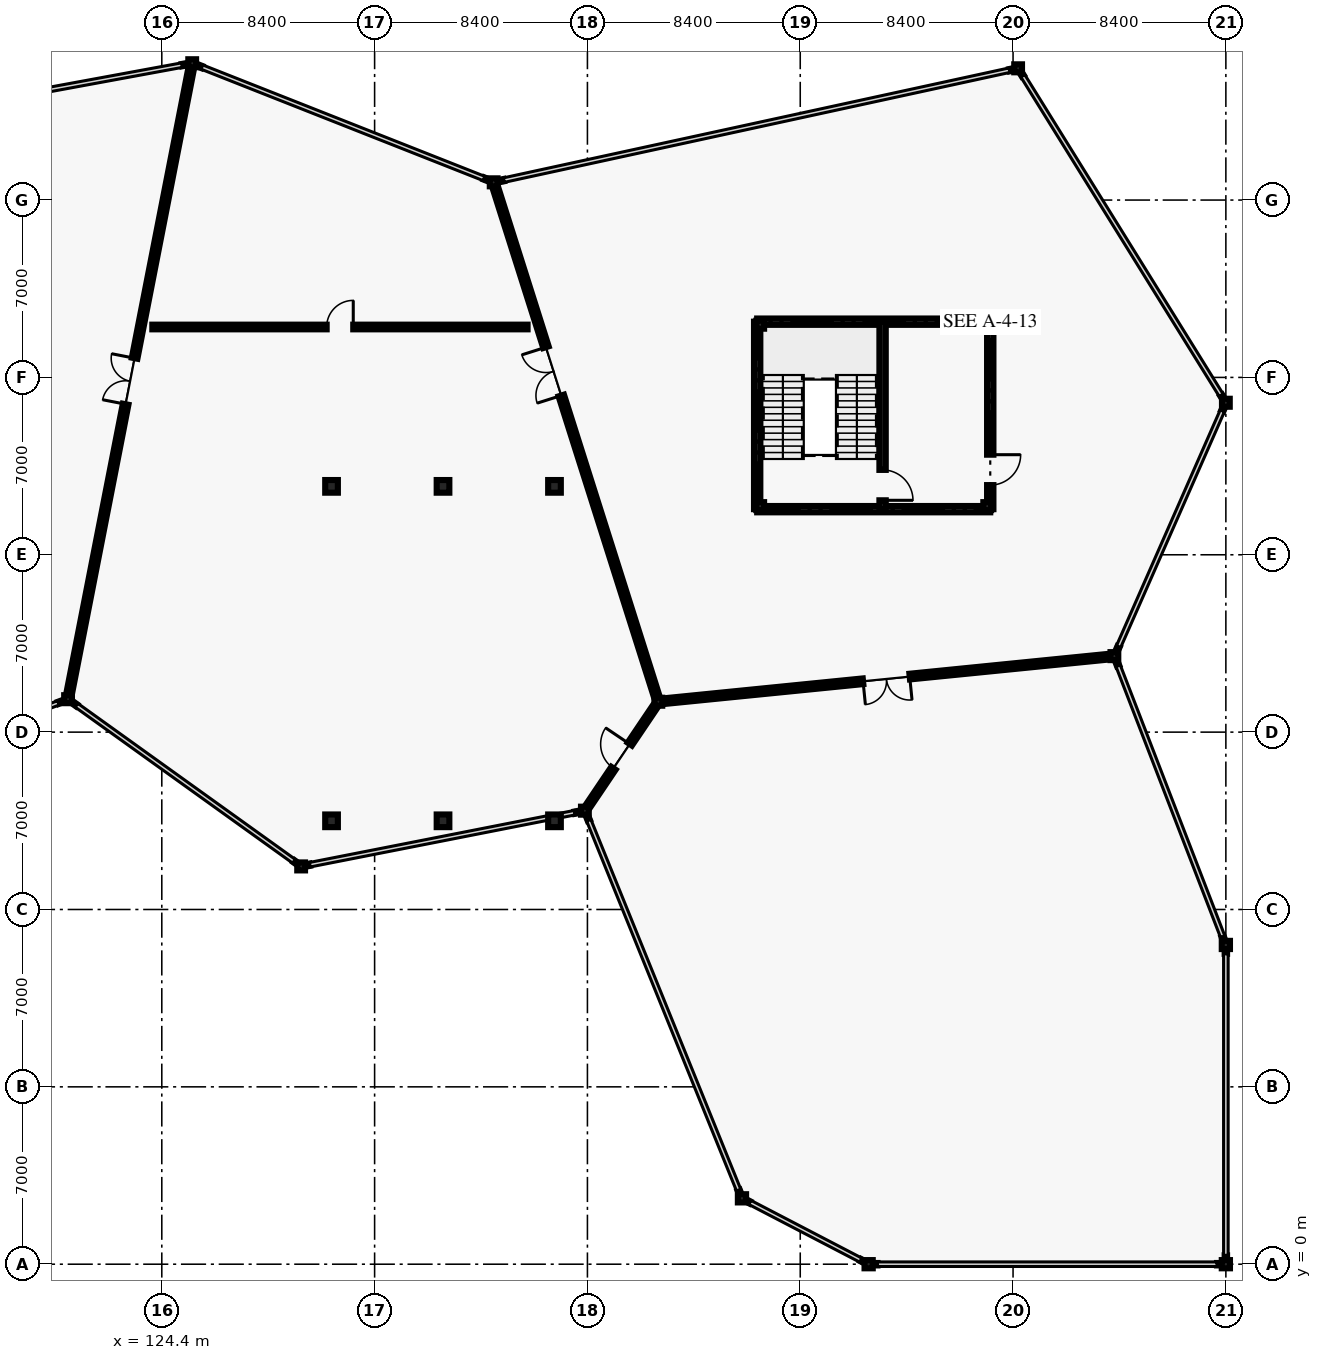
"""IFC4 building model, lengths in metres.
Left out: names, types, materials, properties, quantities, classifications, styles, units other than length and angle.
Written with IfcOpenShell. Run it as: python <this file> out.ifc"""

import sys

from ifc_helpers import new_model, si_unit, direction, frame, frame_2d, origin, origin_2d, place, context, subcontext, project, spatial, rectangle, hollow_circle, i_section, extrude, element, fill, save


model = new_model("IFC4")
c1 = context("Model", 3, precision=1e-05, world=origin(), true_north=direction((0.0, 1.0)))
c2 = subcontext(c1, "Body", "Model", "MODEL_VIEW")
j1 = project(units=[si_unit("LENGTHUNIT", "METRE"), si_unit("PLANEANGLEUNIT", "RADIAN")], contexts=[c1])
p1 = place(None, origin())
s1 = spatial("IfcSite", under=j1, at=p1, CompositionType="ELEMENT")
p2 = place(p1, origin())
s2 = spatial("IfcBuilding", under=s1, at=p2, CompositionType="ELEMENT")
p3 = place(p2, frame((0.0, 0.0, 5.4)))
s3 = spatial("IfcBuildingStorey", under=s2, at=p3, CompositionType="ELEMENT", Elevation=5.4)
for number, where, z_axis, x_axis in (
    (1, (120.7, 22.3, 0.0), (0.0, 0.0, 1.0), (1.0, 0.0, 0.0)),
    (2, (125.6, 47.4, 0.0), (0.0, 0.0, 1.0), (1.0, 0.0, 0.0)),
    (3, (129.9, 15.7, 0.0), (0.0, 0.0, 1.0), (1.0, 0.0, 0.0)),
    (4, (137.5, 42.7, 0.0), (0.0, 0.0, 1.0), (1.0, 0.0, 0.0)),
    (5, (141.1, 17.9, 0.0), (0.0, 0.0, 1.0), (1.0, 0.0, 0.0)),
    (6, (144.0, 22.2, 0.0), (0.0, 0.0, 1.0), (1.0, 0.0, 0.0)),
):
    element("IfcColumn", number, at=place(p3, frame(where, z_axis=z_axis, x_axis=x_axis)), inside=s3, PredefinedType="COLUMN", context=c2, shape_type="SweptSolid", body=[
        extrude(i_section(OverallWidth=0.307, OverallDepth=0.315, WebThickness=0.012, FlangeThickness=0.019, FilletRadius=0.017, at=origin_2d()), origin(), (0.0, 0.0, 1.0), 4.8),
    ])
for number, where, z_axis, x_axis in (
    (7, (147.3, 2.6, 0.0), (0.0, 0.0, 1.0), (1.0, 0.0, 0.0)),
    (8, (152.3, 0.0, 0.0), (0.0, 0.0, 1.0), (1.0, 0.0, 0.0)),
):
    element("IfcColumn", number, at=place(p3, frame(where, z_axis=z_axis, x_axis=x_axis)), inside=s3, PredefinedType="COLUMN", context=c2, shape_type="SweptSolid", body=[
        extrude(hollow_circle(Radius=0.162, WallThickness=0.01, at=origin_2d()), origin(), (0.0, 0.0, 1.0), 4.8),
    ])
for number, where, z_axis, x_axis in (
    (9, (158.2, 47.2, 0.0), (0.0, 0.0, 1.0), (1.0, 0.0, 0.0)),
    (10, (162.0, 24.0, 0.0), (0.0, 0.0, 1.0), (1.0, 0.0, 0.0)),
):
    element("IfcColumn", number, at=place(p3, frame(where, z_axis=z_axis, x_axis=x_axis)), inside=s3, PredefinedType="COLUMN", context=c2, shape_type="SweptSolid", body=[
        extrude(i_section(OverallWidth=0.307, OverallDepth=0.315, WebThickness=0.012, FlangeThickness=0.019, FilletRadius=0.017, at=origin_2d()), origin(), (0.0, 0.0, 1.0), 4.8),
    ])
for number, where, z_axis, x_axis in (
    (11, (166.4, 0.0, 0.0), (0.0, 0.0, 1.0), (1.0, 0.0, 0.0)),
    (12, (166.4, 12.6, 0.0), (0.0, 0.0, 1.0), (1.0, 0.0, 0.0)),
):
    element("IfcColumn", number, at=place(p3, frame(where, z_axis=z_axis, x_axis=x_axis)), inside=s3, PredefinedType="COLUMN", context=c2, shape_type="SweptSolid", body=[
        extrude(hollow_circle(Radius=0.162, WallThickness=0.01, at=origin_2d()), origin(), (0.0, 0.0, 1.0), 4.8),
    ])
p4 = place(p3, frame((166.4, 34.0, 0.0), z_axis=(0.0, 0.0, 1.0), x_axis=(1.0, 0.0, 0.0)))
e13 = element("IfcColumn", 13, at=p4, inside=s3, PredefinedType="COLUMN", context=c2, shape_type="SweptSolid", body=[
    extrude(i_section(OverallWidth=0.307, OverallDepth=0.315, WebThickness=0.012, FlangeThickness=0.019, FilletRadius=0.017, at=origin_2d()), origin(), (0.0, 0.0, 1.0), 4.8),
])
for number, where, z_axis, x_axis in (
    (14, (131.1, 17.5, 0.0), (0.0, 0.0, 1.0), (1.0, 0.0, 0.0)),
    (15, (131.1, 30.7, 0.0), (0.0, 0.0, 1.0), (1.0, 0.0, 0.0)),
    (16, (135.5, 17.5, 0.0), (0.0, 0.0, 1.0), (1.0, 0.0, 0.0)),
    (17, (135.5, 30.7, 0.0), (0.0, 0.0, 1.0), (1.0, 0.0, 0.0)),
    (18, (139.9, 17.5, 0.0), (0.0, 0.0, 1.0), (1.0, 0.0, 0.0)),
    (19, (139.9, 30.7, 0.0), (0.0, 0.0, 1.0), (1.0, 0.0, 0.0)),
):
    element("IfcColumn", number, at=place(p3, frame(where, z_axis=z_axis, x_axis=x_axis)), inside=s3, PredefinedType="COLUMN", context=c2, shape_type="SweptSolid", body=[
        extrude(i_section(OverallWidth=0.5, OverallDepth=0.5, WebThickness=0.022, FlangeThickness=0.036, at=origin_2d()), origin(), (0.0, 0.0, 1.0), 4.8),
    ])
for number, where, z_axis, x_axis in (
    (20, (148.02, 29.92, 0.0), (0.0, 0.0, 1.0), (1.0, 0.0, 0.0)),
    (21, (156.98, 29.92, 0.0), (0.0, 0.0, 1.0), (1.0, 0.0, 0.0)),
    (22, (156.98, 37.08, 0.0), (0.0, 0.0, 1.0), (1.0, 0.0, 0.0)),
    (23, (148.02, 37.08, 0.0), (0.0, 0.0, 1.0), (1.0, 0.0, 0.0)),
):
    element("IfcColumn", number, at=place(p3, frame(where, z_axis=z_axis, x_axis=x_axis)), inside=s3, PredefinedType="COLUMN", context=c2, shape_type="SweptSolid", body=[
        extrude(i_section(OverallWidth=0.307, OverallDepth=0.315, WebThickness=0.012, FlangeThickness=0.019, FilletRadius=0.017, at=origin_2d()), origin(), (0.0, 0.0, 1.0), 4.8),
    ])
for number, where, z_axis, x_axis in (
    (24, (120.605, 22.264, 0.0), (0.0, 0.0, 1.0), (-0.935, -0.354, 0.0)),
    (25, (125.193, 47.325, 0.0), (0.0, 0.0, 1.0), (0.984, 0.178, 0.0)),
):
    element("IfcWall", number, at=place(p3, frame(where, z_axis=z_axis, x_axis=x_axis)), inside=s3, PredefinedType="SOLIDWALL", context=c2, shape_type="SweptSolid", body=[
        extrude(rectangle(XDim=0.308, YDim=0.095, at=frame_2d((0.154, 0.0))), origin(), (0.0, 0.0, 1.0), 3.62),
    ])
p5 = place(p3, frame((125.696, 47.363, 0.0), z_axis=(0.0, 0.0, 1.0), x_axis=(0.929292597209, -0.369344376933, 0.0)))
e26 = element("IfcWall", 26, at=p5, inside=s3, PredefinedType="SOLIDWALL", context=c2, shape_type="SweptSolid", body=[
    extrude(rectangle(XDim=0.309, YDim=0.095, at=frame_2d((0.154, 0.0))), origin(), (0.0, 0.0, 1.0), 3.62),
])
p6 = place(p3, frame((137.118, 42.851, 0.0), z_axis=(0.0, 0.0, 1.0), x_axis=(0.929400367485, -0.369073105115, 0.0)))
e27 = element("IfcWall", 27, at=p6, inside=s3, PredefinedType="SOLIDWALL", context=c2, shape_type="SweptSolid", body=[
    extrude(rectangle(XDim=0.309, YDim=0.095, at=frame_2d((0.154, 0.0))), origin(), (0.0, 0.0, 1.0), 3.62),
])
for number, where, z_axis, x_axis in (
    (28, (129.866, 15.724, 0.0), (0.0, 0.0, 1.0), (-0.812, 0.584, 0.0)),
    (29, (121.033, 22.061, 0.0), (0.0, 0.0, 1.0), (-0.812, 0.584, 0.0)),
):
    element("IfcWall", number, at=place(p3, frame(where, z_axis=z_axis, x_axis=x_axis)), inside=s3, PredefinedType="SOLIDWALL", context=c2, shape_type="SweptSolid", body=[
        extrude(rectangle(XDim=0.308, YDim=0.095, at=frame_2d((0.154, 0.0))), origin(), (0.0, 0.0, 1.0), 3.62),
    ])
for number, where, z_axis, x_axis in (
    (30, (141.0, 17.88, 0.0), (0.0, 0.0, 1.0), (-0.982, -0.191, 0.0)),
    (31, (130.243, 15.767, 0.0), (0.0, 0.0, 1.0), (-0.981, -0.192, 0.0)),
):
    element("IfcWall", number, at=place(p3, frame(where, z_axis=z_axis, x_axis=x_axis)), inside=s3, PredefinedType="SOLIDWALL", context=c2, shape_type="SweptSolid", body=[
        extrude(rectangle(XDim=0.308, YDim=0.095, at=frame_2d((0.154, 0.0))), origin(), (0.0, 0.0, 1.0), 3.62),
    ])
p7 = place(p3, frame((147.284, 2.639, 0.0), z_axis=(0.0, 0.0, 1.0), x_axis=(-0.373990367235, 0.927432587963, 0.0)))
e32 = element("IfcWall", 32, at=p7, inside=s3, PredefinedType="SOLIDWALL", context=c2, shape_type="SweptSolid", body=[
    extrude(rectangle(XDim=0.307, YDim=0.095, at=frame_2d((0.154, 0.0))), origin(), (0.0, 0.0, 1.0), 3.62),
])
p8 = place(p3, frame((141.254, 17.52, 0.0), z_axis=(0.0, 0.0, 1.0), x_axis=(-0.374265965306, 0.927321404484, 0.0)))
e33 = element("IfcWall", 33, at=p8, inside=s3, PredefinedType="SOLIDWALL", context=c2, shape_type="SweptSolid", body=[
    extrude(rectangle(XDim=0.307, YDim=0.095, at=frame_2d((0.154, 0.0))), origin(), (0.0, 0.0, 1.0), 3.62),
])
p9 = place(p3, frame((152.263, 0.019, 0.0), z_axis=(0.0, 0.0, 1.0), x_axis=(-0.888005951379, 0.45983195878, 0.0)))
e34 = element("IfcWall", 34, at=p9, inside=s3, PredefinedType="SOLIDWALL", context=c2, shape_type="SweptSolid", body=[
    extrude(rectangle(XDim=0.309, YDim=0.095, at=frame_2d((0.154, 0.0))), origin(), (0.0, 0.0, 1.0), 3.62),
])
p10 = place(p3, frame((147.611, 2.439, 0.0), z_axis=(0.0, 0.0, 1.0), x_axis=(-0.887850239649, 0.460132537378, 0.0)))
e35 = element("IfcWall", 35, at=p10, inside=s3, PredefinedType="SOLIDWALL", context=c2, shape_type="SweptSolid", body=[
    extrude(rectangle(XDim=0.309, YDim=0.095, at=frame_2d((0.154, 0.0))), origin(), (0.0, 0.0, 1.0), 3.62),
])
for number, where, z_axis, x_axis in (
    (36, (166.358, 0.0, 0.0), (0.0, 0.0, 1.0), (-1.0, 0.0, 0.0)),
    (37, (152.65, 0.0, 0.0), (0.0, 0.0, 1.0), (-1.0, 0.0, 0.0)),
):
    element("IfcWall", number, at=place(p3, frame(where, z_axis=z_axis, x_axis=x_axis)), inside=s3, PredefinedType="SOLIDWALL", context=c2, shape_type="SweptSolid", body=[
        extrude(rectangle(XDim=0.308, YDim=0.095, at=frame_2d((0.154, 0.0))), origin(), (0.0, 0.0, 1.0), 3.62),
    ])
for number, where, z_axis, x_axis in (
    (38, (166.4, 12.558, 0.0), (0.0, 0.0, 1.0), (0.0, -1.0, 0.0)),
    (39, (166.4, 0.35, 0.0), (0.0, 0.0, 1.0), (0.0, -1.0, 0.0)),
):
    element("IfcWall", number, at=place(p3, frame(where, z_axis=z_axis, x_axis=x_axis)), inside=s3, PredefinedType="SOLIDWALL", context=c2, shape_type="SweptSolid", body=[
        extrude(rectangle(XDim=0.308, YDim=0.095, at=frame_2d((0.154, 0.0))), origin(), (0.0, 0.0, 1.0), 3.62),
    ])
p11 = place(p3, frame((162.037, 23.905, 0.0), z_axis=(0.0, 0.0, 1.0), x_axis=(0.359085078765, -0.933304830271, 0.0)))
e40 = element("IfcWall", 40, at=p11, inside=s3, PredefinedType="SOLIDWALL", context=c2, shape_type="SweptSolid", body=[
    extrude(rectangle(XDim=0.309, YDim=0.095, at=frame_2d((0.154, 0.0))), origin(), (0.0, 0.0, 1.0), 3.62),
])
p12 = place(p3, frame((166.274, 12.927, 0.0), z_axis=(0.0, 0.0, 1.0), x_axis=(0.359773736497, -0.933039580365, 0.0)))
e41 = element("IfcWall", 41, at=p12, inside=s3, PredefinedType="SOLIDWALL", context=c2, shape_type="SweptSolid", body=[
    extrude(rectangle(XDim=0.309, YDim=0.095, at=frame_2d((0.154, 0.0))), origin(), (0.0, 0.0, 1.0), 3.62),
])
for number, where, z_axis, x_axis in (
    (42, (166.383, 33.962, 0.0), (0.0, 0.0, 1.0), (-0.403, -0.915, 0.0)),
    (43, (162.165, 24.375, 0.0), (0.0, 0.0, 1.0), (-0.403, -0.915, 0.0)),
):
    element("IfcWall", number, at=place(p3, frame(where, z_axis=z_axis, x_axis=x_axis)), inside=s3, PredefinedType="SOLIDWALL", context=c2, shape_type="SweptSolid", body=[
        extrude(rectangle(XDim=0.308, YDim=0.095, at=frame_2d((0.154, 0.0))), origin(), (0.0, 0.0, 1.0), 3.62),
    ])
for number, where, z_axis, x_axis in (
    (44, (158.222, 47.164, 0.0), (0.0, 0.0, 1.0), (0.53, -0.848, 0.0)),
    (45, (166.215, 34.297, 0.0), (0.0, 0.0, 1.0), (0.529, -0.849, 0.0)),
    (46, (137.6, 42.722, 0.0), (0.0, 0.0, 1.0), (0.977, 0.212, 0.0)),
    (47, (157.858, 47.126, 0.0), (0.0, 0.0, 1.0), (0.978, 0.211, 0.0)),
):
    element("IfcWall", number, at=place(p3, frame(where, z_axis=z_axis, x_axis=x_axis)), inside=s3, PredefinedType="SOLIDWALL", context=c2, shape_type="SweptSolid", body=[
        extrude(rectangle(XDim=0.308, YDim=0.095, at=frame_2d((0.154, 0.0))), origin(), (0.0, 0.0, 1.0), 3.62),
    ])
p13 = place(p3, frame((120.7, 22.3, 0.0), z_axis=(0.0, 0.0, 1.0), x_axis=(0.191608827438, 0.981471373626, 0.0)))
e48 = element("IfcWall", 48, at=p13, inside=s3, PredefinedType="SOLIDWALL", context=c2, shape_type="SweptSolid", body=[
    extrude(rectangle(XDim=25.574, YDim=0.225, at=frame_2d((12.787, 0.0))), origin(), (0.0, 0.0, 1.0), 4.02),
])
p14 = place(p13, frame((11.862, 0.0, 0.0)))
e49 = element("IfcOpeningElement", 49, at=p14, cuts=e48, PredefinedType="OPENING", context=c2, shape_type="SweptSolid", body=[
    extrude(rectangle(XDim=1.85, YDim=2.4, at=frame_2d((0.925, 1.2))), frame((0.0, 0.123, 0.0), z_axis=(0.0, -1.0, 0.0), x_axis=(1.0, 0.0, 0.0)), (0.0, 0.0, 1.0), 0.245),
])
p15 = place(p3, frame((141.1, 17.9, 0.0), z_axis=(0.0, 0.0, 1.0), x_axis=(0.559124361662, 0.829083800467, 0.0)))
e50 = element("IfcWall", 50, at=p15, inside=s3, PredefinedType="SOLIDWALL", context=c2, shape_type="SweptSolid", body=[
    extrude(rectangle(XDim=5.187, YDim=0.205, at=frame_2d((2.593, 0.0))), origin(), (0.0, 0.0, 1.0), 3.32),
])
p16 = place(p15, frame((2.018, 0.0, 0.0)))
e51 = element("IfcOpeningElement", 51, at=p16, cuts=e50, PredefinedType="OPENING", context=c2, shape_type="SweptSolid", body=[
    extrude(rectangle(XDim=1.15, YDim=2.2, at=frame_2d((0.575, 1.1))), frame((0.0, 0.113, 0.0), z_axis=(0.0, -1.0, 0.0), x_axis=(1.0, 0.0, 0.0)), (0.0, 0.0, 1.0), 0.225),
])
p17 = place(p3, frame((144.0, 22.2, 0.0), z_axis=(0.0, 0.0, 1.0), x_axis=(-0.302243860734, 0.953230637699, 0.0)))
e52 = element("IfcWall", 52, at=p17, inside=s3, PredefinedType="SOLIDWALL", context=c2, shape_type="SweptSolid", body=[
    extrude(rectangle(XDim=21.506, YDim=0.225, at=frame_2d((10.753, 0.0))), origin(), (0.0, 0.0, 1.0), 4.02),
])
p18 = place(p17, frame((12.679, 0.0, 0.0)))
e53 = element("IfcOpeningElement", 53, at=p18, cuts=e52, PredefinedType="OPENING", context=c2, shape_type="SweptSolid", body=[
    extrude(rectangle(XDim=2.0, YDim=2.5, at=frame_2d((1.0, 1.25))), frame((0.0, 0.123, 0.0), z_axis=(0.0, -1.0, 0.0), x_axis=(1.0, 0.0, 0.0)), (0.0, 0.0, 1.0), 0.245),
])
p19 = place(p3, frame((162.0, 24.0, 0.0), z_axis=(0.0, 0.0, 1.0), x_axis=(-0.995036922958, -0.099506391506, 0.0)))
e54 = element("IfcWall", 54, at=p19, inside=s3, PredefinedType="SOLIDWALL", context=c2, shape_type="SweptSolid", body=[
    extrude(rectangle(XDim=18.09, YDim=0.225, at=frame_2d((9.045, 0.0))), origin(), (0.0, 0.0, 1.0), 4.02),
])
p20 = place(p19, frame((8.12, 0.0, 0.0)))
e55 = element("IfcOpeningElement", 55, at=p20, cuts=e54, PredefinedType="OPENING", context=c2, shape_type="SweptSolid", body=[
    extrude(rectangle(XDim=1.85, YDim=2.4, at=frame_2d((0.925, 1.2))), frame((0.0, 0.123, 0.0), z_axis=(0.0, -1.0, 0.0), x_axis=(1.0, 0.0, 0.0)), (0.0, 0.0, 1.0), 0.245),
])
p21 = place(p3, frame((124.026, 36.99, 0.0), z_axis=(0.0, 0.0, 1.0), x_axis=(1.0, 0.0, 0.0)))
e56 = element("IfcWall", 56, at=p21, inside=s3, PredefinedType="PARTITIONING", context=c2, shape_type="SweptSolid", body=[
    extrude(rectangle(XDim=14.812, YDim=0.185, at=frame_2d((7.406, 0.0))), origin(), (0.0, 0.0, 1.0), 3.32),
])
p22 = place(p21, frame((6.881, 0.0, 0.0)))
e57 = element("IfcOpeningElement", 57, at=p22, cuts=e56, PredefinedType="OPENING", context=c2, shape_type="SweptSolid", body=[
    extrude(rectangle(XDim=1.05, YDim=2.2, at=frame_2d((0.525, 1.1))), frame((0.0, 0.103, 0.0), z_axis=(0.0, -1.0, 0.0), x_axis=(1.0, 0.0, 0.0)), (0.0, 0.0, 1.0), 0.205),
])
p23 = place(p3, frame((147.9, 29.8, 0.0), z_axis=(0.0, 0.0, 1.0), x_axis=(0.0, 1.0, 0.0)))
e58 = element("IfcWall", 58, at=p23, inside=s3, PredefinedType="SHEAR", context=c2, shape_type="SweptSolid", body=[
    extrude(rectangle(XDim=7.4, YDim=0.25, at=frame_2d((3.7, 0.0))), origin(), (0.0, 0.0, 1.0), 4.56),
])
for number, where, z_axis, x_axis in (
    (59, (147.9, 37.2, 0.0), (0.0, 0.0, 1.0), (1.0, 0.0, 0.0)),
    (60, (157.1, 29.8, 0.0), (0.0, 0.0, 1.0), (-1.0, 0.0, 0.0)),
):
    element("IfcWall", number, at=place(p3, frame(where, z_axis=z_axis, x_axis=x_axis)), inside=s3, PredefinedType="SHEAR", context=c2, shape_type="SweptSolid", body=[
        extrude(rectangle(XDim=9.2, YDim=0.25, at=frame_2d((4.6, 0.0))), origin(), (0.0, 0.0, 1.0), 4.56),
    ])
p24 = place(p3, frame((157.1, 37.2, 0.0), z_axis=(0.0, 0.0, 1.0), x_axis=(0.0, -1.0, 0.0)))
e61 = element("IfcWall", 61, at=p24, inside=s3, PredefinedType="SHEAR", context=c2, shape_type="SweptSolid", body=[
    extrude(rectangle(XDim=7.4, YDim=0.25, at=frame_2d((3.7, 0.0))), origin(), (0.0, 0.0, 1.0), 4.56),
])
p25 = place(p24, frame((5.25, 0.0, 0.0)))
e62 = element("IfcOpeningElement", 62, at=p25, cuts=e61, PredefinedType="OPENING", context=c2, shape_type="SweptSolid", body=[
    extrude(rectangle(XDim=1.2, YDim=2.2, at=frame_2d((0.6, 1.1))), frame((0.0, 0.135, 0.0), z_axis=(0.0, -1.0, 0.0), x_axis=(1.0, 0.0, 0.0)), (0.0, 0.0, 1.0), 0.27),
])
p26 = place(p3, frame((152.85, 37.2, 0.0), z_axis=(0.0, 0.0, 1.0), x_axis=(0.0, -1.0, 0.0)))
e63 = element("IfcWall", 63, at=p26, inside=s3, PredefinedType="SHEAR", context=c2, shape_type="SweptSolid", body=[
    extrude(rectangle(XDim=7.4, YDim=0.25, at=frame_2d((3.7, 0.0))), origin(), (0.0, 0.0, 1.0), 4.56),
])
p27 = place(p26, frame((5.85, 0.0, 0.0)))
e64 = element("IfcOpeningElement", 64, at=p27, cuts=e63, PredefinedType="OPENING", context=c2, shape_type="SweptSolid", body=[
    extrude(rectangle(XDim=1.2, YDim=2.2, at=frame_2d((0.6, 1.1))), frame((0.0, 0.135, 0.0), z_axis=(0.0, -1.0, 0.0), x_axis=(1.0, 0.0, 0.0)), (0.0, 0.0, 1.0), 0.27),
])
p28 = place(p14, origin())
e65 = element("IfcDoor", 65, at=p28, inside=s3, OperationType="DOUBLE_DOOR_SINGLE_SWING", PredefinedType="DOOR", context=c2, shape_type="SweptSolid", body=[
    extrude(rectangle(XDim=1.85, YDim=2.4, at=frame_2d((0.925, 1.2))), frame((0.0, 0.025, 0.0), z_axis=(0.0, -1.0, 0.0), x_axis=(1.0, 0.0, 0.0)), (0.0, 0.0, 1.0), 0.05),
])
fill(e49, e65)
p29 = place(p16, origin())
e66 = element("IfcDoor", 66, at=p29, inside=s3, OperationType="SINGLE_SWING_RIGHT", PredefinedType="DOOR", context=c2, shape_type="SweptSolid", body=[
    extrude(rectangle(XDim=1.15, YDim=2.2, at=frame_2d((0.575, 1.1))), frame((0.0, 0.025, 0.0), z_axis=(0.0, -1.0, 0.0), x_axis=(1.0, 0.0, 0.0)), (0.0, 0.0, 1.0), 0.05),
])
fill(e51, e66)
p30 = place(p18, origin())
e67 = element("IfcDoor", 67, at=p30, inside=s3, OperationType="DOUBLE_DOOR_SINGLE_SWING", PredefinedType="DOOR", context=c2, shape_type="SweptSolid", body=[
    extrude(rectangle(XDim=2.0, YDim=2.5, at=frame_2d((1.0, 1.25))), frame((0.0, 0.025, 0.0), z_axis=(0.0, -1.0, 0.0), x_axis=(1.0, 0.0, 0.0)), (0.0, 0.0, 1.0), 0.05),
])
fill(e53, e67)
p31 = place(p20, origin())
e68 = element("IfcDoor", 68, at=p31, inside=s3, OperationType="DOUBLE_DOOR_SINGLE_SWING", PredefinedType="DOOR", context=c2, shape_type="SweptSolid", body=[
    extrude(rectangle(XDim=1.85, YDim=2.4, at=frame_2d((0.925, 1.2))), frame((0.0, 0.025, 0.0), z_axis=(0.0, -1.0, 0.0), x_axis=(1.0, 0.0, 0.0)), (0.0, 0.0, 1.0), 0.05),
])
fill(e55, e68)
p32 = place(p22, origin())
e69 = element("IfcDoor", 69, at=p32, inside=s3, OperationType="SINGLE_SWING_RIGHT", PredefinedType="DOOR", context=c2, shape_type="SweptSolid", body=[
    extrude(rectangle(XDim=1.05, YDim=2.2, at=frame_2d((0.525, 1.1))), frame((0.0, 0.025, 0.0), z_axis=(0.0, -1.0, 0.0), x_axis=(1.0, 0.0, 0.0)), (0.0, 0.0, 1.0), 0.05),
])
fill(e57, e69)
p33 = place(p25, origin())
e70 = element("IfcDoor", 70, at=p33, inside=s3, OperationType="SINGLE_SWING_LEFT", PredefinedType="DOOR", context=c2, shape_type="SweptSolid", body=[
    extrude(rectangle(XDim=1.2, YDim=2.2, at=frame_2d((0.6, 1.1))), frame((0.0, 0.025, 0.0), z_axis=(0.0, -1.0, 0.0), x_axis=(1.0, 0.0, 0.0)), (0.0, 0.0, 1.0), 0.05),
])
fill(e62, e70)
p34 = place(p27, origin())
e71 = element("IfcDoor", 71, at=p34, inside=s3, OperationType="SINGLE_SWING_RIGHT", PredefinedType="DOOR", context=c2, shape_type="SweptSolid", body=[
    extrude(rectangle(XDim=1.2, YDim=2.2, at=frame_2d((0.6, 1.1))), frame((0.0, 0.025, 0.0), z_axis=(0.0, -1.0, 0.0), x_axis=(1.0, 0.0, 0.0)), (0.0, 0.0, 1.0), 0.05),
])
fill(e64, e71)
save(model, sys.argv[1])
